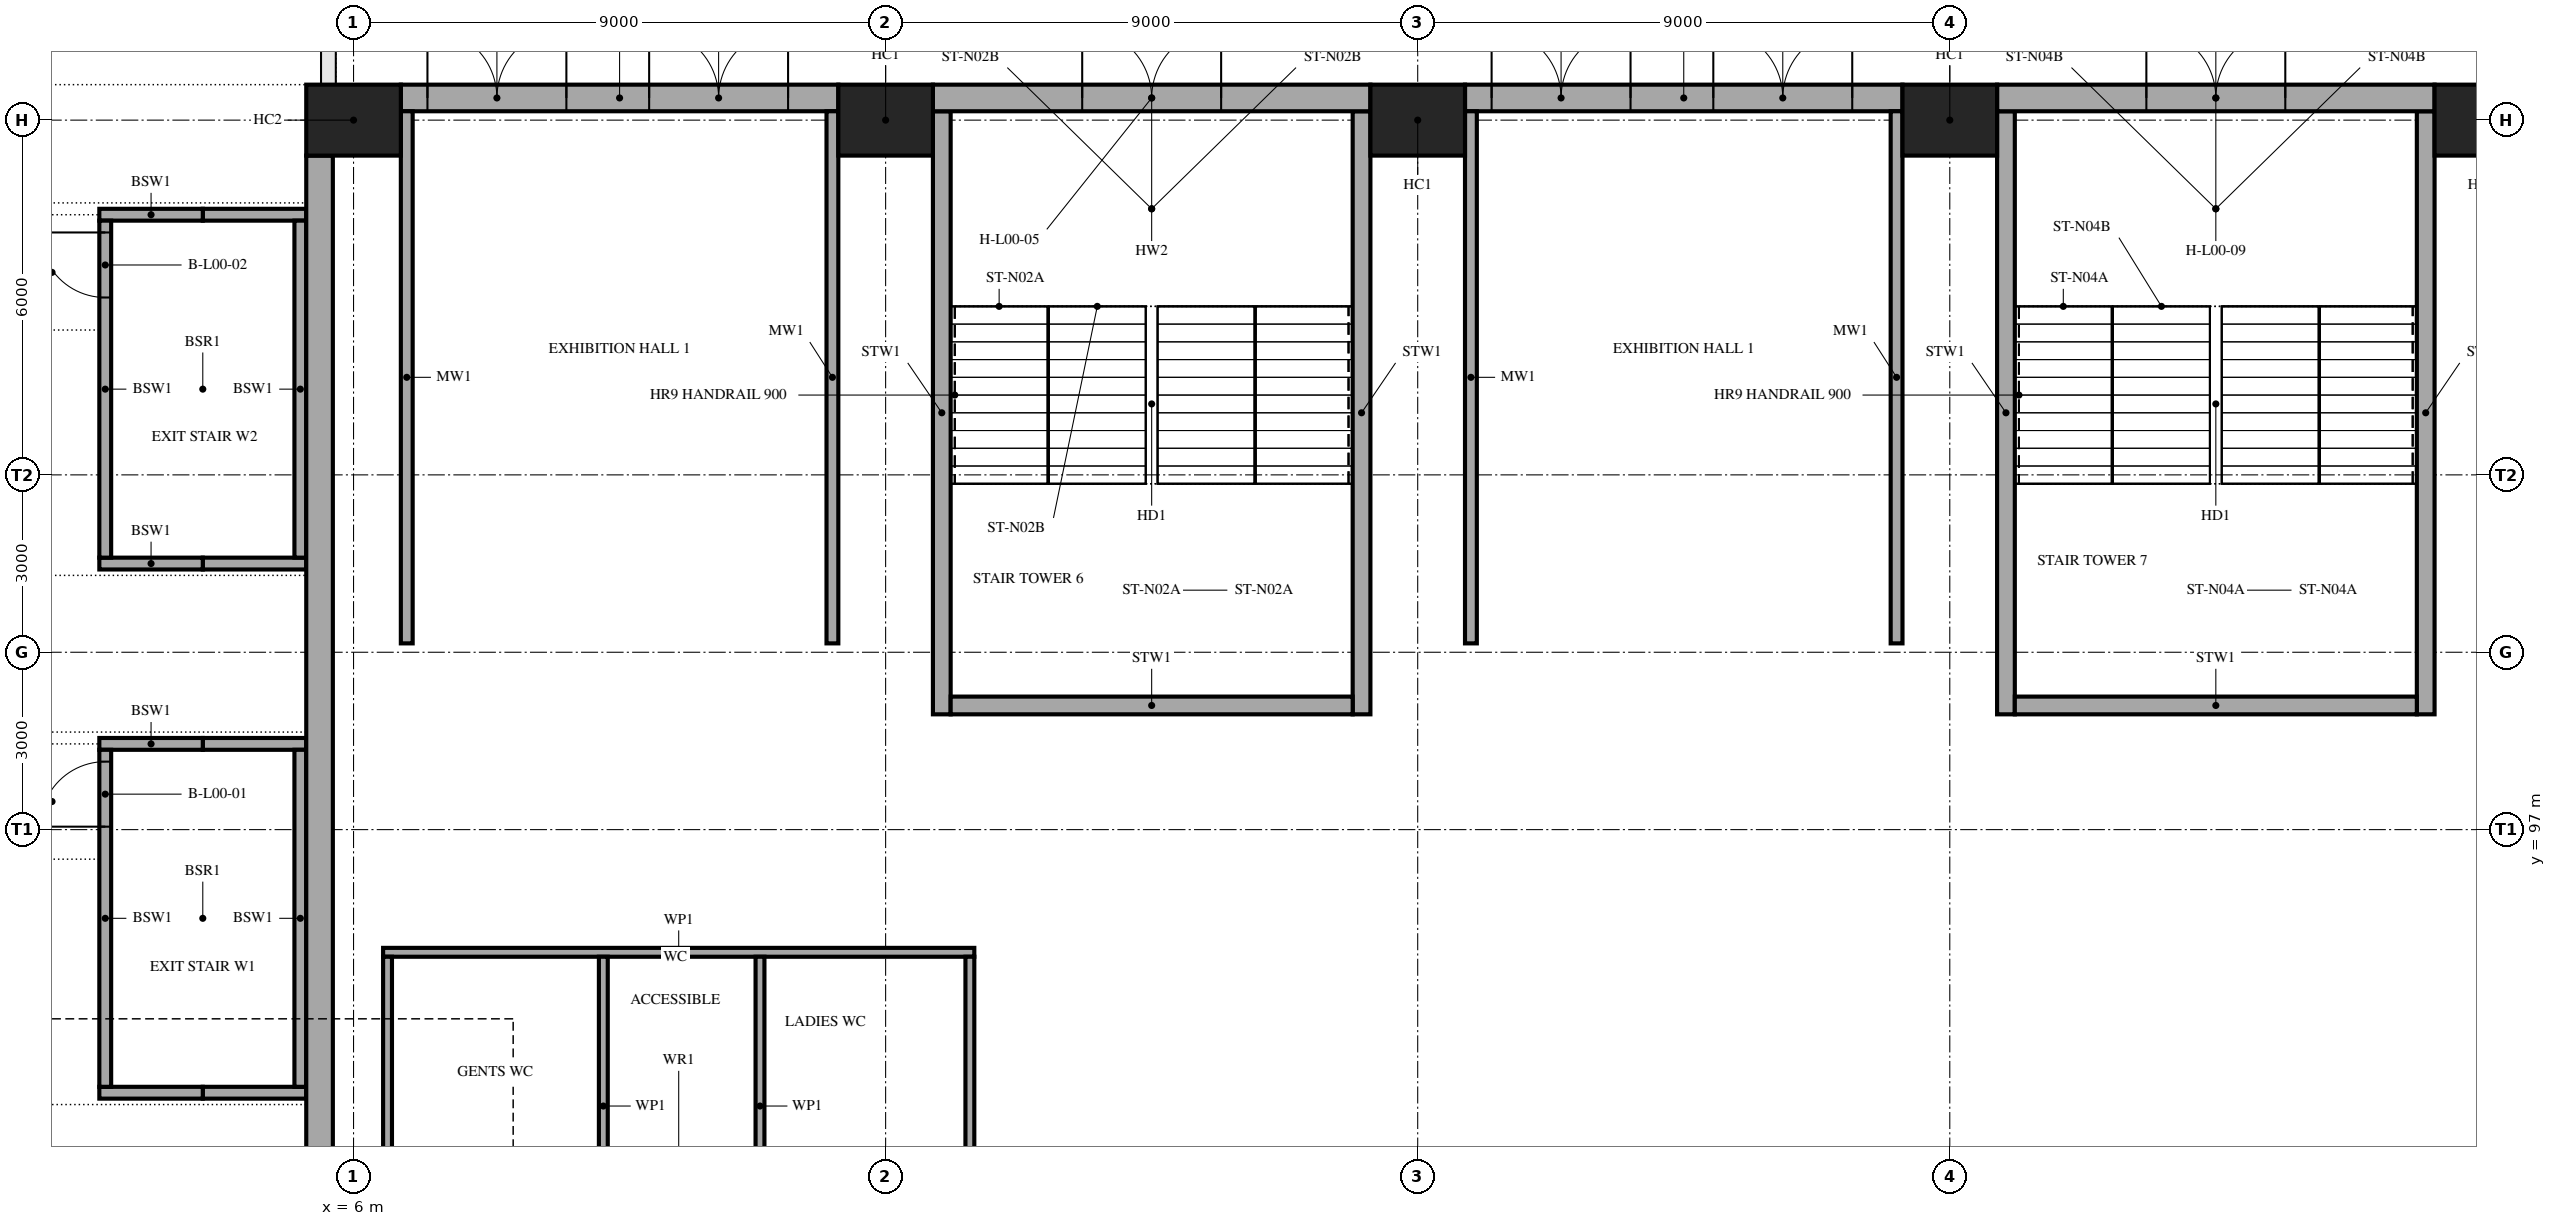
"""IFC4 building model, lengths in metres.
Left out: names, types, materials, properties, quantities, classifications, styles, units other than length and angle.
Written with IfcOpenShell. Run it as: python <this file> out.ifc"""

import sys

from ifc_helpers import new_model, si_unit, direction, frame, frame_2d, origin, origin_2d, place, context, subcontext, project, spatial, rectangle, extrude, element, fill, save


model = new_model("IFC4")
c1 = context("Model", 3, precision=1e-05, world=origin(), true_north=direction((0.0, 1.0)))
c2 = subcontext(c1, "Body", "Model", "MODEL_VIEW")
j1 = project(units=[si_unit("LENGTHUNIT", "METRE"), si_unit("PLANEANGLEUNIT", "RADIAN")], contexts=[c1])
p1 = place(None, origin())
s1 = spatial("IfcSite", under=j1, at=p1, CompositionType="ELEMENT")
p2 = place(p1, origin())
s2 = spatial("IfcBuilding", under=s1, at=p2, CompositionType="ELEMENT")
p3 = place(p2, origin())
s3 = spatial("IfcBuildingStorey", under=s2, at=p3, CompositionType="ELEMENT", Elevation=0.0)
for number, where, z_axis, x_axis in (
    (1, (6.0, 109.0, 0.0), (0.0, 0.0, 1.0), (1.0, 0.0, 0.0)),
    (2, (15.0, 109.0, 0.0), (0.0, 0.0, 1.0), (1.0, 0.0, 0.0)),
    (3, (24.0, 109.0, 0.0), (0.0, 0.0, 1.0), (1.0, 0.0, 0.0)),
    (4, (33.0, 109.0, 0.0), (0.0, 0.0, 1.0), (1.0, 0.0, 0.0)),
    (5, (42.0, 109.0, 0.0), (0.0, 0.0, 1.0), (1.0, 0.0, 0.0)),
):
    element("IfcColumn", number, at=place(p3, frame(where, z_axis=z_axis, x_axis=x_axis)), inside=s3, PredefinedType="COLUMN", context=c2, shape_type="SweptSolid", body=[
        extrude(rectangle(XDim=1.6, YDim=1.2, at=origin_2d()), origin(), (0.0, 0.0, 1.0), 5.0),
    ])
for number, where, z_axis, x_axis in (
    (6, (15.95, 109.15, 0.0), (0.0, 0.0, 1.0), (0.0, -1.0, 0.0)),
    (7, (23.05, 109.15, 0.0), (0.0, 0.0, 1.0), (0.0, -1.0, 0.0)),
):
    element("IfcWall", number, at=place(p3, frame(where, z_axis=z_axis, x_axis=x_axis)), inside=s3, PredefinedType="SHEAR", context=c2, shape_type="SweptSolid", body=[
        extrude(rectangle(XDim=10.2, YDim=0.3, at=frame_2d((5.1, 0.0))), origin(), (0.0, 0.0, 1.0), 5.0),
    ])
p4 = place(p3, frame((16.1, 99.1, 0.0), z_axis=(0.0, 0.0, 1.0), x_axis=(1.0, 0.0, 0.0)))
e8 = element("IfcWall", 8, at=p4, inside=s3, PredefinedType="SHEAR", context=c2, shape_type="SweptSolid", body=[
    extrude(rectangle(XDim=6.8, YDim=0.3, at=frame_2d((3.4, 0.0))), origin(), (0.0, 0.0, 1.0), 5.0),
])
for number, where, z_axis, x_axis in (
    (9, (33.95, 109.15, 0.0), (0.0, 0.0, 1.0), (0.0, -1.0, 0.0)),
    (10, (41.05, 109.15, 0.0), (0.0, 0.0, 1.0), (0.0, -1.0, 0.0)),
):
    element("IfcWall", number, at=place(p3, frame(where, z_axis=z_axis, x_axis=x_axis)), inside=s3, PredefinedType="SHEAR", context=c2, shape_type="SweptSolid", body=[
        extrude(rectangle(XDim=10.2, YDim=0.3, at=frame_2d((5.1, 0.0))), origin(), (0.0, 0.0, 1.0), 5.0),
    ])
p5 = place(p3, frame((34.1, 99.1, 0.0), z_axis=(0.0, 0.0, 1.0), x_axis=(1.0, 0.0, 0.0)))
e11 = element("IfcWall", 11, at=p5, inside=s3, PredefinedType="SHEAR", context=c2, shape_type="SweptSolid", body=[
    extrude(rectangle(XDim=6.8, YDim=0.3, at=frame_2d((3.4, 0.0))), origin(), (0.0, 0.0, 1.0), 5.0),
])
for number, where, z_axis, x_axis in (
    (12, (5.2, 98.45, 0.0), (0.0, 0.0, 1.0), (-1.0, 0.0, 0.0)),
    (13, (3.45, 98.45, 0.0), (0.0, 0.0, 1.0), (-1.0, 0.0, 0.0)),
    (14, (5.2, 92.55, 0.0), (0.0, 0.0, 1.0), (-1.0, 0.0, 0.0)),
    (15, (3.45, 92.55, 0.0), (0.0, 0.0, 1.0), (-1.0, 0.0, 0.0)),
):
    element("IfcWall", number, at=place(p3, frame(where, z_axis=z_axis, x_axis=x_axis)), inside=s3, PredefinedType="SOLIDWALL", context=c2, shape_type="SweptSolid", body=[
        extrude(rectangle(XDim=1.75, YDim=0.2, at=frame_2d((0.875, 0.0))), origin(), (0.0, 0.0, 1.0), 3.2),
    ])
p6 = place(p3, frame((1.8, 98.35, 0.0), z_axis=(0.0, 0.0, 1.0), x_axis=(0.0, -1.0, 0.0)))
e16 = element("IfcWall", 16, at=p6, inside=s3, PredefinedType="SOLIDWALL", context=c2, shape_type="SweptSolid", body=[
    extrude(rectangle(XDim=5.7, YDim=0.2, at=frame_2d((2.85, 0.0))), origin(), (0.0, 0.0, 1.0), 3.2),
])
p7 = place(p6, frame((0.2, 0.0, 0.0)))
e17 = element("IfcOpeningElement", 17, at=p7, cuts=e16, PredefinedType="OPENING", context=c2, shape_type="SweptSolid", body=[
    extrude(rectangle(XDim=1.1, YDim=2.1, at=frame_2d((0.55, 1.05))), frame((0.0, 0.11, 0.0), z_axis=(0.0, -1.0, 0.0), x_axis=(1.0, 0.0, 0.0)), (0.0, 0.0, 1.0), 0.22),
])
p8 = place(p3, frame((5.1, 98.35, 0.0), z_axis=(0.0, 0.0, 1.0), x_axis=(0.0, -1.0, 0.0)))
e18 = element("IfcWall", 18, at=p8, inside=s3, PredefinedType="SOLIDWALL", context=c2, shape_type="SweptSolid", body=[
    extrude(rectangle(XDim=5.7, YDim=0.2, at=frame_2d((2.85, 0.0))), origin(), (0.0, 0.0, 1.0), 3.2),
])
for number, where, z_axis, x_axis in (
    (19, (5.2, 107.4, 0.0), (0.0, 0.0, 1.0), (-1.0, 0.0, 0.0)),
    (20, (3.45, 107.4, 0.0), (0.0, 0.0, 1.0), (-1.0, 0.0, 0.0)),
    (21, (5.2, 101.5, 0.0), (0.0, 0.0, 1.0), (-1.0, 0.0, 0.0)),
    (22, (3.45, 101.5, 0.0), (0.0, 0.0, 1.0), (-1.0, 0.0, 0.0)),
):
    element("IfcWall", number, at=place(p3, frame(where, z_axis=z_axis, x_axis=x_axis)), inside=s3, PredefinedType="SOLIDWALL", context=c2, shape_type="SweptSolid", body=[
        extrude(rectangle(XDim=1.75, YDim=0.2, at=frame_2d((0.875, 0.0))), origin(), (0.0, 0.0, 1.0), 3.2),
    ])
p9 = place(p3, frame((1.8, 107.3, 0.0), z_axis=(0.0, 0.0, 1.0), x_axis=(0.0, -1.0, 0.0)))
e23 = element("IfcWall", 23, at=p9, inside=s3, PredefinedType="SOLIDWALL", context=c2, shape_type="SweptSolid", body=[
    extrude(rectangle(XDim=5.7, YDim=0.2, at=frame_2d((2.85, 0.0))), origin(), (0.0, 0.0, 1.0), 3.2),
])
p10 = place(p9, frame((0.2, 0.0, 0.0)))
e24 = element("IfcOpeningElement", 24, at=p10, cuts=e23, PredefinedType="OPENING", context=c2, shape_type="SweptSolid", body=[
    extrude(rectangle(XDim=1.1, YDim=2.1, at=frame_2d((0.55, 1.05))), frame((0.0, 0.11, 0.0), z_axis=(0.0, -1.0, 0.0), x_axis=(1.0, 0.0, 0.0)), (0.0, 0.0, 1.0), 0.22),
])
p11 = place(p3, frame((5.1, 107.3, 0.0), z_axis=(0.0, 0.0, 1.0), x_axis=(0.0, -1.0, 0.0)))
e25 = element("IfcWall", 25, at=p11, inside=s3, PredefinedType="SOLIDWALL", context=c2, shape_type="SweptSolid", body=[
    extrude(rectangle(XDim=5.7, YDim=0.2, at=frame_2d((2.85, 0.0))), origin(), (0.0, 0.0, 1.0), 3.2),
])
p12 = place(p3, frame((6.8, 109.375, 0.0), z_axis=(0.0, 0.0, 1.0), x_axis=(1.0, 0.0, 0.0)))
e26 = element("IfcWall", 26, at=p12, inside=s3, PredefinedType="SOLIDWALL", context=c2, shape_type="SweptSolid", body=[
    extrude(rectangle(XDim=7.4, YDim=0.45, at=frame_2d((3.7, 0.0))), origin(), (0.0, 0.0, 1.0), 5.0),
])
p13 = place(p12, frame((0.45, 0.0, 0.0)))
e27 = element("IfcOpeningElement", 27, at=p13, cuts=e26, PredefinedType="OPENING", context=c2, shape_type="SweptSolid", body=[
    extrude(rectangle(XDim=2.35, YDim=2.4, at=frame_2d((1.175, 1.2))), frame((0.0, 0.235, 0.0), z_axis=(0.0, -1.0, 0.0), x_axis=(1.0, 0.0, 0.0)), (0.0, 0.0, 1.0), 0.47),
])
p14 = place(p12, frame((4.2, 0.0, 0.0)))
e28 = element("IfcOpeningElement", 28, at=p14, cuts=e26, PredefinedType="OPENING", context=c2, shape_type="SweptSolid", body=[
    extrude(rectangle(XDim=2.35, YDim=2.4, at=frame_2d((1.175, 1.2))), frame((0.0, 0.235, 0.0), z_axis=(0.0, -1.0, 0.0), x_axis=(1.0, 0.0, 0.0)), (0.0, 0.0, 1.0), 0.47),
])
p15 = place(p3, frame((15.8, 109.375, 0.0), z_axis=(0.0, 0.0, 1.0), x_axis=(1.0, 0.0, 0.0)))
e29 = element("IfcWall", 29, at=p15, inside=s3, PredefinedType="SOLIDWALL", context=c2, shape_type="SweptSolid", body=[
    extrude(rectangle(XDim=7.4, YDim=0.45, at=frame_2d((3.7, 0.0))), origin(), (0.0, 0.0, 1.0), 5.0),
])
p16 = place(p15, frame((2.525, 0.0, 0.0)))
e30 = element("IfcOpeningElement", 30, at=p16, cuts=e29, PredefinedType="OPENING", context=c2, shape_type="SweptSolid", body=[
    extrude(rectangle(XDim=2.35, YDim=2.1, at=frame_2d((1.175, 1.05))), frame((0.0, 0.235, 0.0), z_axis=(0.0, -1.0, 0.0), x_axis=(1.0, 0.0, 0.0)), (0.0, 0.0, 1.0), 0.47),
])
p17 = place(p3, frame((24.8, 109.375, 0.0), z_axis=(0.0, 0.0, 1.0), x_axis=(1.0, 0.0, 0.0)))
e31 = element("IfcWall", 31, at=p17, inside=s3, PredefinedType="SOLIDWALL", context=c2, shape_type="SweptSolid", body=[
    extrude(rectangle(XDim=7.4, YDim=0.45, at=frame_2d((3.7, 0.0))), origin(), (0.0, 0.0, 1.0), 5.0),
])
p18 = place(p17, frame((0.45, 0.0, 0.0)))
e32 = element("IfcOpeningElement", 32, at=p18, cuts=e31, PredefinedType="OPENING", context=c2, shape_type="SweptSolid", body=[
    extrude(rectangle(XDim=2.35, YDim=2.4, at=frame_2d((1.175, 1.2))), frame((0.0, 0.235, 0.0), z_axis=(0.0, -1.0, 0.0), x_axis=(1.0, 0.0, 0.0)), (0.0, 0.0, 1.0), 0.47),
])
p19 = place(p17, frame((4.2, 0.0, 0.0)))
e33 = element("IfcOpeningElement", 33, at=p19, cuts=e31, PredefinedType="OPENING", context=c2, shape_type="SweptSolid", body=[
    extrude(rectangle(XDim=2.35, YDim=2.4, at=frame_2d((1.175, 1.2))), frame((0.0, 0.235, 0.0), z_axis=(0.0, -1.0, 0.0), x_axis=(1.0, 0.0, 0.0)), (0.0, 0.0, 1.0), 0.47),
])
p20 = place(p3, frame((33.8, 109.375, 0.0), z_axis=(0.0, 0.0, 1.0), x_axis=(1.0, 0.0, 0.0)))
e34 = element("IfcWall", 34, at=p20, inside=s3, PredefinedType="SOLIDWALL", context=c2, shape_type="SweptSolid", body=[
    extrude(rectangle(XDim=7.4, YDim=0.45, at=frame_2d((3.7, 0.0))), origin(), (0.0, 0.0, 1.0), 5.0),
])
p21 = place(p20, frame((2.525, 0.0, 0.0)))
e35 = element("IfcOpeningElement", 35, at=p21, cuts=e34, PredefinedType="OPENING", context=c2, shape_type="SweptSolid", body=[
    extrude(rectangle(XDim=2.35, YDim=2.1, at=frame_2d((1.175, 1.05))), frame((0.0, 0.235, 0.0), z_axis=(0.0, -1.0, 0.0), x_axis=(1.0, 0.0, 0.0)), (0.0, 0.0, 1.0), 0.47),
])
p22 = place(p3, frame((5.425, 46.75, 0.0), z_axis=(0.0, 0.0, 1.0), x_axis=(0.0, 1.0, 0.0)))
e36 = element("IfcWall", 36, at=p22, inside=s3, PredefinedType="SOLIDWALL", context=c2, shape_type="SweptSolid", body=[
    extrude(rectangle(XDim=61.65, YDim=0.45, at=frame_2d((30.825, 0.0))), origin(), (0.0, 0.0, 1.0), 5.0),
])
p23 = place(p22, frame((5.95, 0.0, 0.0)))
e37 = element("IfcOpeningElement", 37, at=p23, cuts=e36, PredefinedType="OPENING", context=c2, shape_type="SweptSolid", body=[
    extrude(rectangle(XDim=1.2, YDim=2.1, at=frame_2d((0.6, 1.05))), frame((0.0, 0.235, 0.0), z_axis=(0.0, -1.0, 0.0), x_axis=(1.0, 0.0, 0.0)), (0.0, 0.0, 1.0), 0.47),
])
p24 = place(p3, frame((6.5, 94.925, 0.0), z_axis=(0.0, 0.0, 1.0), x_axis=(1.0, 0.0, 0.0)))
e38 = element("IfcWall", 38, at=p24, inside=s3, PredefinedType="SOLIDWALL", context=c2, shape_type="SweptSolid", body=[
    extrude(rectangle(XDim=10.0, YDim=0.15, at=frame_2d((5.0, 0.0))), origin(), (0.0, 0.0, 1.0), 3.45),
])
for number, where, z_axis, x_axis in (
    (39, (6.575, 86.15, 0.0), (0.0, 0.0, 1.0), (0.0, 1.0, 0.0)),
    (40, (16.425, 86.15, 0.0), (0.0, 0.0, 1.0), (0.0, 1.0, 0.0)),
):
    element("IfcWall", number, at=place(p3, frame(where, z_axis=z_axis, x_axis=x_axis)), inside=s3, PredefinedType="SOLIDWALL", context=c2, shape_type="SweptSolid", body=[
        extrude(rectangle(XDim=8.7, YDim=0.15, at=frame_2d((4.35, 0.0))), origin(), (0.0, 0.0, 1.0), 3.45),
    ])
for number, where, z_axis, x_axis in (
    (41, (10.225, 89.8, 0.0), (0.0, 0.0, 1.0), (0.0, 1.0, 0.0)),
    (42, (12.875, 89.8, 0.0), (0.0, 0.0, 1.0), (0.0, 1.0, 0.0)),
):
    element("IfcWall", number, at=place(p3, frame(where, z_axis=z_axis, x_axis=x_axis)), inside=s3, PredefinedType="SOLIDWALL", context=c2, shape_type="SweptSolid", body=[
        extrude(rectangle(XDim=5.05, YDim=0.15, at=frame_2d((2.525, 0.0))), origin(), (0.0, 0.0, 1.0), 3.45),
    ])
for number, where, z_axis, x_axis in (
    (43, (6.9, 100.15, 0.0), (0.0, 0.0, 1.0), (0.0, 1.0, 0.0)),
    (44, (14.1, 100.15, 0.0), (0.0, 0.0, 1.0), (0.0, 1.0, 0.0)),
    (45, (24.9, 100.15, 0.0), (0.0, 0.0, 1.0), (0.0, 1.0, 0.0)),
    (46, (32.1, 100.15, 0.0), (0.0, 0.0, 1.0), (0.0, 1.0, 0.0)),
):
    element("IfcWall", number, at=place(p3, frame(where, z_axis=z_axis, x_axis=x_axis)), inside=s3, PredefinedType="SHEAR", context=c2, shape_type="SweptSolid", body=[
        extrude(rectangle(XDim=9.0, YDim=0.2, at=frame_2d((4.5, 0.0))), origin(), (0.0, 0.0, 1.0), 4.75),
    ])
p25 = place(p7, frame((1.1, 0.0, 0.0), z_axis=(0.0, 0.0, 1.0), x_axis=(-1.0, 0.0, 0.0)))
e47 = element("IfcDoor", 47, at=p25, inside=s3, OperationType="SINGLE_SWING_LEFT", PredefinedType="DOOR", context=c2, shape_type="SweptSolid", body=[
    extrude(rectangle(XDim=1.1, YDim=2.1, at=frame_2d((0.55, 1.05))), frame((0.0, 0.025, 0.0), z_axis=(0.0, -1.0, 0.0), x_axis=(1.0, 0.0, 0.0)), (0.0, 0.0, 1.0), 0.05),
])
fill(e17, e47)
p26 = place(p10, frame((1.1, 0.0, 0.0), z_axis=(0.0, 0.0, 1.0), x_axis=(-1.0, 0.0, 0.0)))
e48 = element("IfcDoor", 48, at=p26, inside=s3, OperationType="SINGLE_SWING_RIGHT", PredefinedType="DOOR", context=c2, shape_type="SweptSolid", body=[
    extrude(rectangle(XDim=1.1, YDim=2.1, at=frame_2d((0.55, 1.05))), frame((0.0, 0.025, 0.0), z_axis=(0.0, -1.0, 0.0), x_axis=(1.0, 0.0, 0.0)), (0.0, 0.0, 1.0), 0.05),
])
fill(e24, e48)
p27 = place(p13, origin())
e49 = element("IfcDoor", 49, at=p27, inside=s3, OperationType="DOUBLE_DOOR_SINGLE_SWING", PredefinedType="DOOR", context=c2, shape_type="SweptSolid", body=[
    extrude(rectangle(XDim=2.35, YDim=2.4, at=frame_2d((1.175, 1.2))), frame((0.0, 0.025, 0.0), z_axis=(0.0, -1.0, 0.0), x_axis=(1.0, 0.0, 0.0)), (0.0, 0.0, 1.0), 0.05),
])
fill(e27, e49)
p28 = place(p14, origin())
e50 = element("IfcDoor", 50, at=p28, inside=s3, OperationType="DOUBLE_DOOR_SINGLE_SWING", PredefinedType="DOOR", context=c2, shape_type="SweptSolid", body=[
    extrude(rectangle(XDim=2.35, YDim=2.4, at=frame_2d((1.175, 1.2))), frame((0.0, 0.025, 0.0), z_axis=(0.0, -1.0, 0.0), x_axis=(1.0, 0.0, 0.0)), (0.0, 0.0, 1.0), 0.05),
])
fill(e28, e50)
p29 = place(p16, origin())
e51 = element("IfcDoor", 51, at=p29, inside=s3, OperationType="DOUBLE_DOOR_SINGLE_SWING", PredefinedType="DOOR", context=c2, shape_type="SweptSolid", body=[
    extrude(rectangle(XDim=2.35, YDim=2.1, at=frame_2d((1.175, 1.05))), frame((0.0, 0.025, 0.0), z_axis=(0.0, -1.0, 0.0), x_axis=(1.0, 0.0, 0.0)), (0.0, 0.0, 1.0), 0.05),
])
fill(e30, e51)
p30 = place(p18, origin())
e52 = element("IfcDoor", 52, at=p30, inside=s3, OperationType="DOUBLE_DOOR_SINGLE_SWING", PredefinedType="DOOR", context=c2, shape_type="SweptSolid", body=[
    extrude(rectangle(XDim=2.35, YDim=2.4, at=frame_2d((1.175, 1.2))), frame((0.0, 0.025, 0.0), z_axis=(0.0, -1.0, 0.0), x_axis=(1.0, 0.0, 0.0)), (0.0, 0.0, 1.0), 0.05),
])
fill(e32, e52)
p31 = place(p19, origin())
e53 = element("IfcDoor", 53, at=p31, inside=s3, OperationType="DOUBLE_DOOR_SINGLE_SWING", PredefinedType="DOOR", context=c2, shape_type="SweptSolid", body=[
    extrude(rectangle(XDim=2.35, YDim=2.4, at=frame_2d((1.175, 1.2))), frame((0.0, 0.025, 0.0), z_axis=(0.0, -1.0, 0.0), x_axis=(1.0, 0.0, 0.0)), (0.0, 0.0, 1.0), 0.05),
])
fill(e33, e53)
p32 = place(p21, origin())
e54 = element("IfcDoor", 54, at=p32, inside=s3, OperationType="DOUBLE_DOOR_SINGLE_SWING", PredefinedType="DOOR", context=c2, shape_type="SweptSolid", body=[
    extrude(rectangle(XDim=2.35, YDim=2.1, at=frame_2d((1.175, 1.05))), frame((0.0, 0.025, 0.0), z_axis=(0.0, -1.0, 0.0), x_axis=(1.0, 0.0, 0.0)), (0.0, 0.0, 1.0), 0.05),
])
fill(e35, e54)
save(model, sys.argv[1])
